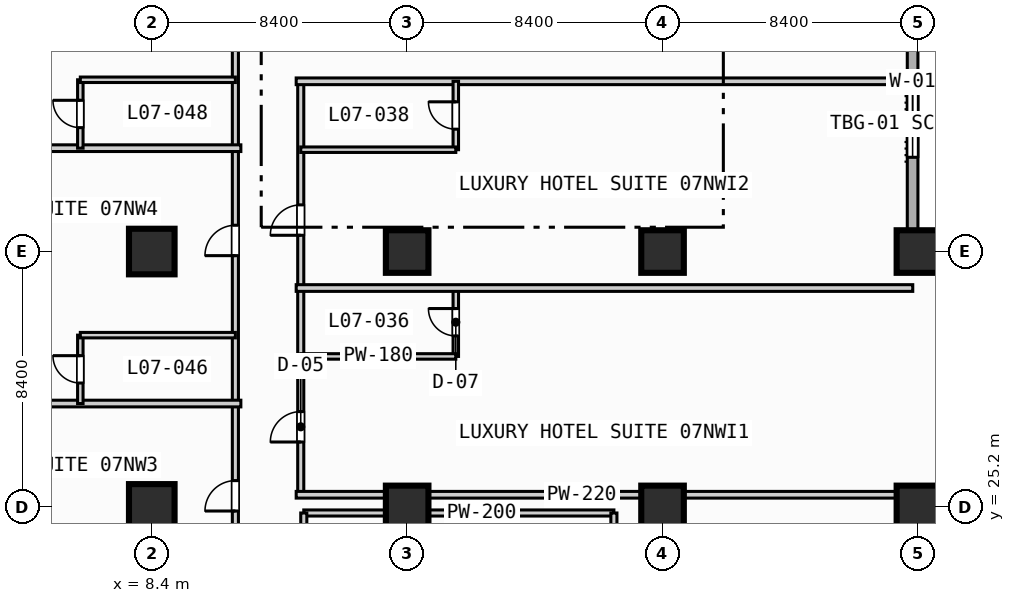
"""IFC4 building model, lengths in metres.
Left out: names, types, materials, properties, quantities, classifications, styles, units other than length and angle.
Written with IfcOpenShell. Run it as: python <this file> out.ifc"""

import sys

from ifc_helpers import new_model, si_unit, direction, frame, frame_2d, origin, origin_2d, place, context, subcontext, project, spatial, rectangle, extrude, element, fill, save


model = new_model("IFC4")
c1 = context("Model", 3, precision=1e-05, world=origin(), true_north=direction((0.0, 1.0)))
c2 = subcontext(c1, "Body", "Model", "MODEL_VIEW")
j1 = project(units=[si_unit("LENGTHUNIT", "METRE"), si_unit("PLANEANGLEUNIT", "RADIAN")], contexts=[c1])
p1 = place(None, origin())
s1 = spatial("IfcSite", under=j1, at=p1, CompositionType="ELEMENT")
p2 = place(p1, origin())
s2 = spatial("IfcBuilding", under=s1, at=p2, CompositionType="ELEMENT")
p3 = place(p2, frame((0.0, 0.0, 35.8)))
s3 = spatial("IfcBuildingStorey", under=s2, at=p3, CompositionType="ELEMENT", Elevation=35.8)
for number, where, z_axis, x_axis in (
    (1, (8.4, 25.2, 0.0), (0.0, 0.0, 1.0), (1.0, 0.0, 0.0)),
    (2, (8.4, 33.6, 0.0), (0.0, 0.0, 1.0), (1.0, 0.0, 0.0)),
):
    element("IfcColumn", number, at=place(p3, frame(where, z_axis=z_axis, x_axis=x_axis)), inside=s3, PredefinedType="COLUMN", context=c2, shape_type="SweptSolid", body=[
        extrude(rectangle(XDim=1.5, YDim=1.5, at=origin_2d()), origin(), (0.0, 0.0, 1.0), 3.8),
    ])
for number, where, z_axis, x_axis in (
    (3, (16.8, 25.2, 0.0), (0.0, 0.0, 1.0), (1.0, 0.0, 0.0)),
    (4, (16.8, 33.6, 0.0), (0.0, 0.0, 1.0), (1.0, 0.0, 0.0)),
    (5, (25.2, 25.2, 0.0), (0.0, 0.0, 1.0), (1.0, 0.0, 0.0)),
    (6, (25.2, 33.6, 0.0), (0.0, 0.0, 1.0), (1.0, 0.0, 0.0)),
    (7, (33.6, 25.2, 0.0), (0.0, 0.0, 1.0), (1.0, 0.0, 0.0)),
    (8, (33.6, 33.6, 0.0), (0.0, 0.0, 1.0), (1.0, 0.0, 0.0)),
):
    element("IfcColumn", number, at=place(p3, frame(where, z_axis=z_axis, x_axis=x_axis)), inside=s3, PredefinedType="COLUMN", context=c2, shape_type="SweptSolid", body=[
        extrude(rectangle(XDim=1.4, YDim=1.4, at=origin_2d()), origin(), (0.0, 0.0, 1.0), 3.8),
    ])
p4 = place(p3, frame((33.425, 89.225, 0.0), z_axis=(0.0, 0.0, 1.0), x_axis=(0.0, -1.0, 0.0)))
e9 = element("IfcWall", 9, at=p4, inside=s3, PredefinedType="STANDARD", context=c2, shape_type="SweptSolid", body=[
    extrude(rectangle(XDim=55.8, YDim=0.35, at=frame_2d((27.9, 0.0))), origin(), (0.0, 0.0, 1.0), 3.55),
])
p5 = place(p4, frame((50.325, 0.0, 0.85)))
e10 = element("IfcOpeningElement", 10, at=p5, cuts=e9, PredefinedType="OPENING", context=c2, shape_type="SweptSolid", body=[
    extrude(rectangle(XDim=2.2, YDim=1.8, at=frame_2d((1.1, 0.9))), frame((0.0, 0.185, 0.0), z_axis=(0.0, -1.0, 0.0), x_axis=(1.0, 0.0, 0.0)), (0.0, 0.0, 1.0), 0.37),
])
p6 = place(p3, frame((33.425, 33.425, 0.0), z_axis=(0.0, 0.0, 1.0), x_axis=(1.0, 0.0, 0.0)))
e11 = element("IfcWall", 11, at=p6, inside=s3, PredefinedType="STANDARD", context=c2, shape_type="SweptSolid", body=[
    extrude(rectangle(XDim=55.8, YDim=0.35, at=frame_2d((27.9, 0.0))), origin(), (0.0, 0.0, 1.0), 3.55),
])
p7 = place(p6, frame((12.075, 0.0, 0.0)))
e12 = element("IfcOpeningElement", 12, at=p7, cuts=e11, PredefinedType="OPENING", context=c2, shape_type="SweptSolid", body=[
    extrude(rectangle(XDim=1.4, YDim=2.2, at=frame_2d((0.7, 1.1))), frame((0.0, 0.185, 0.0), z_axis=(0.0, -1.0, 0.0), x_axis=(1.0, 0.0, 0.0)), (0.0, 0.0, 1.0), 0.37),
])
p8 = place(p3, frame((18.6, 13.4, 0.0), z_axis=(0.0, 0.0, 1.0), x_axis=(0.0, 1.0, 0.0)))
e13 = element("IfcWall", 13, at=p8, inside=s3, PredefinedType="PARTITIONING", context=c2, shape_type="SweptSolid", body=[
    extrude(rectangle(XDim=11.6, YDim=0.16, at=frame_2d((5.8, 0.0))), origin(), (0.0, 0.0, 1.0), 3.55),
])
p9 = place(p3, frame((13.4, 25.0, 0.0), z_axis=(0.0, 0.0, 1.0), x_axis=(1.0, 0.0, 0.0)))
e14 = element("IfcWall", 14, at=p9, inside=s3, PredefinedType="PARTITIONING", context=c2, shape_type="SweptSolid", body=[
    extrude(rectangle(XDim=10.2, YDim=0.2, at=frame_2d((5.1, 0.0))), origin(), (0.0, 0.0, 1.0), 2.8),
])
for number, where, z_axis, x_axis in (
    (15, (13.4, 13.4, 0.0), (0.0, 0.0, 1.0), (0.0, 1.0, 0.0)),
    (16, (23.6, 13.4, 0.0), (0.0, 0.0, 1.0), (0.0, 1.0, 0.0)),
):
    element("IfcWall", number, at=place(p3, frame(where, z_axis=z_axis, x_axis=x_axis)), inside=s3, PredefinedType="PARTITIONING", context=c2, shape_type="SweptSolid", body=[
        extrude(rectangle(XDim=11.6, YDim=0.2, at=frame_2d((5.8, 0.0))), origin(), (0.0, 0.0, 1.0), 3.55),
    ])
p10 = place(p3, frame((13.3, 25.6, 0.0), z_axis=(0.0, 0.0, 1.0), x_axis=(0.0, 1.0, 0.0)))
e17 = element("IfcWall", 17, at=p10, inside=s3, PredefinedType="PARTITIONING", context=c2, shape_type="SweptSolid", body=[
    extrude(rectangle(XDim=13.6, YDim=0.2, at=frame_2d((6.8, 0.0))), origin(), (0.0, 0.0, 1.0), 3.55),
])
p11 = place(p10, frame((1.735, 0.0, 0.0)))
e18 = element("IfcOpeningElement", 18, at=p11, cuts=e17, PredefinedType="OPENING", context=c2, shape_type="SweptSolid", body=[
    extrude(rectangle(XDim=1.0, YDim=2.15, at=frame_2d((0.5, 1.075))), frame((0.0, 0.11, 0.0), z_axis=(0.0, -1.0, 0.0), x_axis=(1.0, 0.0, 0.0)), (0.0, 0.0, 1.0), 0.22),
])
p12 = place(p10, frame((8.535, 0.0, 0.0)))
e19 = element("IfcOpeningElement", 19, at=p12, cuts=e17, PredefinedType="OPENING", context=c2, shape_type="SweptSolid", body=[
    extrude(rectangle(XDim=1.0, YDim=2.15, at=frame_2d((0.5, 1.075))), frame((0.0, 0.11, 0.0), z_axis=(0.0, -1.0, 0.0), x_axis=(1.0, 0.0, 0.0)), (0.0, 0.0, 1.0), 0.22),
])
p13 = place(p3, frame((13.15, 25.6, 0.0), z_axis=(0.0, 0.0, 1.0), x_axis=(1.0, 0.0, 0.0)))
e20 = element("IfcWall", 20, at=p13, inside=s3, PredefinedType="PARTITIONING", context=c2, shape_type="SweptSolid", body=[
    extrude(rectangle(XDim=20.28, YDim=0.22, at=frame_2d((10.14, 0.0))), origin(), (0.0, 0.0, 1.0), 3.55),
])
p14 = place(p3, frame((18.4, 30.15, 0.0), z_axis=(0.0, 0.0, 1.0), x_axis=(0.0, 1.0, 0.0)))
e21 = element("IfcWall", 21, at=p14, inside=s3, PredefinedType="PLUMBINGWALL", context=c2, shape_type="SweptSolid", body=[
    extrude(rectangle(XDim=2.25, YDim=0.18, at=frame_2d((1.125, 0.0))), origin(), (0.0, 0.0, 1.0), 3.55),
])
p15 = place(p14, frame((0.675, 0.0, 0.0)))
e22 = element("IfcOpeningElement", 22, at=p15, cuts=e21, PredefinedType="OPENING", context=c2, shape_type="SweptSolid", body=[
    extrude(rectangle(XDim=0.9, YDim=2.1, at=frame_2d((0.45, 1.05))), frame((0.0, 0.1, 0.0), z_axis=(0.0, -1.0, 0.0), x_axis=(1.0, 0.0, 0.0)), (0.0, 0.0, 1.0), 0.2),
])
p16 = place(p3, frame((13.3, 30.15, 0.0), z_axis=(0.0, 0.0, 1.0), x_axis=(1.0, 0.0, 0.0)))
e23 = element("IfcWall", 23, at=p16, inside=s3, PredefinedType="PLUMBINGWALL", context=c2, shape_type="SweptSolid", body=[
    extrude(rectangle(XDim=5.1, YDim=0.18, at=frame_2d((2.55, 0.0))), origin(), (0.0, 0.0, 1.0), 3.55),
])
for number, where, z_axis, x_axis in (
    (24, (13.15, 32.4, 0.0), (0.0, 0.0, 1.0), (1.0, 0.0, 0.0)),
    (25, (13.15, 39.2, 0.0), (0.0, 0.0, 1.0), (1.0, 0.0, 0.0)),
):
    element("IfcWall", number, at=place(p3, frame(where, z_axis=z_axis, x_axis=x_axis)), inside=s3, PredefinedType="PARTITIONING", context=c2, shape_type="SweptSolid", body=[
        extrude(rectangle(XDim=20.28, YDim=0.22, at=frame_2d((10.14, 0.0))), origin(), (0.0, 0.0, 1.0), 3.55),
    ])
p17 = place(p3, frame((18.4, 36.95, 0.0), z_axis=(0.0, 0.0, 1.0), x_axis=(0.0, 1.0, 0.0)))
e26 = element("IfcWall", 26, at=p17, inside=s3, PredefinedType="PLUMBINGWALL", context=c2, shape_type="SweptSolid", body=[
    extrude(rectangle(XDim=2.25, YDim=0.18, at=frame_2d((1.125, 0.0))), origin(), (0.0, 0.0, 1.0), 3.55),
])
p18 = place(p17, frame((0.675, 0.0, 0.0)))
e27 = element("IfcOpeningElement", 27, at=p18, cuts=e26, PredefinedType="OPENING", context=c2, shape_type="SweptSolid", body=[
    extrude(rectangle(XDim=0.9, YDim=2.1, at=frame_2d((0.45, 1.05))), frame((0.0, 0.1, 0.0), z_axis=(0.0, -1.0, 0.0), x_axis=(1.0, 0.0, 0.0)), (0.0, 0.0, 1.0), 0.2),
])
p19 = place(p3, frame((13.3, 36.95, 0.0), z_axis=(0.0, 0.0, 1.0), x_axis=(1.0, 0.0, 0.0)))
e28 = element("IfcWall", 28, at=p19, inside=s3, PredefinedType="PLUMBINGWALL", context=c2, shape_type="SweptSolid", body=[
    extrude(rectangle(XDim=5.1, YDim=0.18, at=frame_2d((2.55, 0.0))), origin(), (0.0, 0.0, 1.0), 3.55),
])
p20 = place(p3, frame((11.15, 3.4, 0.0), z_axis=(0.0, 0.0, 1.0), x_axis=(0.0, 1.0, 0.0)))
e29 = element("IfcWall", 29, at=p20, inside=s3, PredefinedType="PARTITIONING", context=c2, shape_type="SweptSolid", body=[
    extrude(rectangle(XDim=85.4, YDim=0.2, at=frame_2d((42.7, 0.0))), origin(), (0.0, 0.0, 1.0), 3.55),
])
p21 = place(p20, frame((4.865, 0.0, 0.0)))
e30 = element("IfcOpeningElement", 30, at=p21, cuts=e29, PredefinedType="OPENING", context=c2, shape_type="SweptSolid", body=[
    extrude(rectangle(XDim=1.0, YDim=2.15, at=frame_2d((0.5, 1.075))), frame((0.0, 0.11, 0.0), z_axis=(0.0, -1.0, 0.0), x_axis=(1.0, 0.0, 0.0)), (0.0, 0.0, 1.0), 0.22),
])
p22 = place(p20, frame((13.265, 0.0, 0.0)))
e31 = element("IfcOpeningElement", 31, at=p22, cuts=e29, PredefinedType="OPENING", context=c2, shape_type="SweptSolid", body=[
    extrude(rectangle(XDim=1.0, YDim=2.15, at=frame_2d((0.5, 1.075))), frame((0.0, 0.11, 0.0), z_axis=(0.0, -1.0, 0.0), x_axis=(1.0, 0.0, 0.0)), (0.0, 0.0, 1.0), 0.22),
])
p23 = place(p20, frame((21.665, 0.0, 0.0)))
e32 = element("IfcOpeningElement", 32, at=p23, cuts=e29, PredefinedType="OPENING", context=c2, shape_type="SweptSolid", body=[
    extrude(rectangle(XDim=1.0, YDim=2.15, at=frame_2d((0.5, 1.075))), frame((0.0, 0.11, 0.0), z_axis=(0.0, -1.0, 0.0), x_axis=(1.0, 0.0, 0.0)), (0.0, 0.0, 1.0), 0.22),
])
p24 = place(p20, frame((30.065, 0.0, 0.0)))
e33 = element("IfcOpeningElement", 33, at=p24, cuts=e29, PredefinedType="OPENING", context=c2, shape_type="SweptSolid", body=[
    extrude(rectangle(XDim=1.0, YDim=2.15, at=frame_2d((0.5, 1.075))), frame((0.0, 0.11, 0.0), z_axis=(0.0, -1.0, 0.0), x_axis=(1.0, 0.0, 0.0)), (0.0, 0.0, 1.0), 0.22),
])
p25 = place(p20, frame((38.465, 0.0, 0.0)))
e34 = element("IfcOpeningElement", 34, at=p25, cuts=e29, PredefinedType="OPENING", context=c2, shape_type="SweptSolid", body=[
    extrude(rectangle(XDim=1.0, YDim=2.15, at=frame_2d((0.5, 1.075))), frame((0.0, 0.11, 0.0), z_axis=(0.0, -1.0, 0.0), x_axis=(1.0, 0.0, 0.0)), (0.0, 0.0, 1.0), 0.22),
])
p26 = place(p20, frame((46.865, 0.0, 0.0)))
e35 = element("IfcOpeningElement", 35, at=p26, cuts=e29, PredefinedType="OPENING", context=c2, shape_type="SweptSolid", body=[
    extrude(rectangle(XDim=1.0, YDim=2.15, at=frame_2d((0.5, 1.075))), frame((0.0, 0.11, 0.0), z_axis=(0.0, -1.0, 0.0), x_axis=(1.0, 0.0, 0.0)), (0.0, 0.0, 1.0), 0.22),
])
p27 = place(p20, frame((55.265, 0.0, 0.0)))
e36 = element("IfcOpeningElement", 36, at=p27, cuts=e29, PredefinedType="OPENING", context=c2, shape_type="SweptSolid", body=[
    extrude(rectangle(XDim=1.0, YDim=2.15, at=frame_2d((0.5, 1.075))), frame((0.0, 0.11, 0.0), z_axis=(0.0, -1.0, 0.0), x_axis=(1.0, 0.0, 0.0)), (0.0, 0.0, 1.0), 0.22),
])
p28 = place(p20, frame((63.665, 0.0, 0.0)))
e37 = element("IfcOpeningElement", 37, at=p28, cuts=e29, PredefinedType="OPENING", context=c2, shape_type="SweptSolid", body=[
    extrude(rectangle(XDim=1.0, YDim=2.15, at=frame_2d((0.5, 1.075))), frame((0.0, 0.11, 0.0), z_axis=(0.0, -1.0, 0.0), x_axis=(1.0, 0.0, 0.0)), (0.0, 0.0, 1.0), 0.22),
])
p29 = place(p20, frame((72.065, 0.0, 0.0)))
e38 = element("IfcOpeningElement", 38, at=p29, cuts=e29, PredefinedType="OPENING", context=c2, shape_type="SweptSolid", body=[
    extrude(rectangle(XDim=1.0, YDim=2.15, at=frame_2d((0.5, 1.075))), frame((0.0, 0.11, 0.0), z_axis=(0.0, -1.0, 0.0), x_axis=(1.0, 0.0, 0.0)), (0.0, 0.0, 1.0), 0.22),
])
p30 = place(p20, frame((81.165, 0.0, 0.0)))
e39 = element("IfcOpeningElement", 39, at=p30, cuts=e29, PredefinedType="OPENING", context=c2, shape_type="SweptSolid", body=[
    extrude(rectangle(XDim=1.0, YDim=2.15, at=frame_2d((0.5, 1.075))), frame((0.0, 0.11, 0.0), z_axis=(0.0, -1.0, 0.0), x_axis=(1.0, 0.0, 0.0)), (0.0, 0.0, 1.0), 0.22),
])
p31 = place(p3, frame((0.2, 28.6, 0.0), z_axis=(0.0, 0.0, 1.0), x_axis=(1.0, 0.0, 0.0)))
e40 = element("IfcWall", 40, at=p31, inside=s3, PredefinedType="PARTITIONING", context=c2, shape_type="SweptSolid", body=[
    extrude(rectangle(XDim=11.13, YDim=0.22, at=frame_2d((5.565, 0.0))), origin(), (0.0, 0.0, 1.0), 3.55),
])
p32 = place(p3, frame((6.05, 28.6, 0.0), z_axis=(0.0, 0.0, 1.0), x_axis=(0.0, 1.0, 0.0)))
e41 = element("IfcWall", 41, at=p32, inside=s3, PredefinedType="PLUMBINGWALL", context=c2, shape_type="SweptSolid", body=[
    extrude(rectangle(XDim=2.25, YDim=0.18, at=frame_2d((1.125, 0.0))), origin(), (0.0, 0.0, 1.0), 3.55),
])
p33 = place(p32, frame((0.675, 0.0, 0.0)))
e42 = element("IfcOpeningElement", 42, at=p33, cuts=e41, PredefinedType="OPENING", context=c2, shape_type="SweptSolid", body=[
    extrude(rectangle(XDim=0.9, YDim=2.1, at=frame_2d((0.45, 1.05))), frame((0.0, 0.1, 0.0), z_axis=(0.0, -1.0, 0.0), x_axis=(1.0, 0.0, 0.0)), (0.0, 0.0, 1.0), 0.2),
])
p34 = place(p3, frame((6.05, 30.85, 0.0), z_axis=(0.0, 0.0, 1.0), x_axis=(1.0, 0.0, 0.0)))
e43 = element("IfcWall", 43, at=p34, inside=s3, PredefinedType="PLUMBINGWALL", context=c2, shape_type="SweptSolid", body=[
    extrude(rectangle(XDim=5.1, YDim=0.18, at=frame_2d((2.55, 0.0))), origin(), (0.0, 0.0, 1.0), 3.55),
])
p35 = place(p3, frame((0.2, 37.0, 0.0), z_axis=(0.0, 0.0, 1.0), x_axis=(1.0, 0.0, 0.0)))
e44 = element("IfcWall", 44, at=p35, inside=s3, PredefinedType="PARTITIONING", context=c2, shape_type="SweptSolid", body=[
    extrude(rectangle(XDim=11.13, YDim=0.22, at=frame_2d((5.565, 0.0))), origin(), (0.0, 0.0, 1.0), 3.55),
])
p36 = place(p3, frame((6.05, 37.0, 0.0), z_axis=(0.0, 0.0, 1.0), x_axis=(0.0, 1.0, 0.0)))
e45 = element("IfcWall", 45, at=p36, inside=s3, PredefinedType="PLUMBINGWALL", context=c2, shape_type="SweptSolid", body=[
    extrude(rectangle(XDim=2.25, YDim=0.18, at=frame_2d((1.125, 0.0))), origin(), (0.0, 0.0, 1.0), 3.55),
])
p37 = place(p36, frame((0.675, 0.0, 0.0)))
e46 = element("IfcOpeningElement", 46, at=p37, cuts=e45, PredefinedType="OPENING", context=c2, shape_type="SweptSolid", body=[
    extrude(rectangle(XDim=0.9, YDim=2.1, at=frame_2d((0.45, 1.05))), frame((0.0, 0.1, 0.0), z_axis=(0.0, -1.0, 0.0), x_axis=(1.0, 0.0, 0.0)), (0.0, 0.0, 1.0), 0.2),
])
p38 = place(p3, frame((6.05, 39.25, 0.0), z_axis=(0.0, 0.0, 1.0), x_axis=(1.0, 0.0, 0.0)))
e47 = element("IfcWall", 47, at=p38, inside=s3, PredefinedType="PLUMBINGWALL", context=c2, shape_type="SweptSolid", body=[
    extrude(rectangle(XDim=5.1, YDim=0.18, at=frame_2d((2.55, 0.0))), origin(), (0.0, 0.0, 1.0), 3.55),
])
p39 = place(p5, origin())
e48 = element("IfcWindow", 48, at=p39, inside=s3, PartitioningType="SINGLE_PANEL", PredefinedType="WINDOW", context=c2, shape_type="SweptSolid", body=[
    extrude(rectangle(XDim=2.2, YDim=1.8, at=frame_2d((1.1, 0.9))), frame((0.0, 0.03, 0.0), z_axis=(0.0, -1.0, 0.0), x_axis=(1.0, 0.0, 0.0)), (0.0, 0.0, 1.0), 0.06),
])
fill(e10, e48)
p40 = place(p11, origin())
e49 = element("IfcDoor", 49, at=p40, inside=s3, OperationType="SINGLE_SWING_LEFT", PredefinedType="DOOR", context=c2, shape_type="SweptSolid", body=[
    extrude(rectangle(XDim=1.0, YDim=2.15, at=frame_2d((0.5, 1.075))), frame((0.0, 0.025, 0.0), z_axis=(0.0, -1.0, 0.0), x_axis=(1.0, 0.0, 0.0)), (0.0, 0.0, 1.0), 0.05),
])
fill(e18, e49)
p41 = place(p12, origin())
e50 = element("IfcDoor", 50, at=p41, inside=s3, OperationType="SINGLE_SWING_LEFT", PredefinedType="DOOR", context=c2, shape_type="SweptSolid", body=[
    extrude(rectangle(XDim=1.0, YDim=2.15, at=frame_2d((0.5, 1.075))), frame((0.0, 0.025, 0.0), z_axis=(0.0, -1.0, 0.0), x_axis=(1.0, 0.0, 0.0)), (0.0, 0.0, 1.0), 0.05),
])
fill(e19, e50)
p42 = place(p15, origin())
e51 = element("IfcDoor", 51, at=p42, inside=s3, OperationType="SINGLE_SWING_RIGHT", PredefinedType="DOOR", context=c2, shape_type="SweptSolid", body=[
    extrude(rectangle(XDim=0.9, YDim=2.1, at=frame_2d((0.45, 1.05))), frame((0.0, 0.025, 0.0), z_axis=(0.0, -1.0, 0.0), x_axis=(1.0, 0.0, 0.0)), (0.0, 0.0, 1.0), 0.05),
])
fill(e22, e51)
p43 = place(p18, origin())
e52 = element("IfcDoor", 52, at=p43, inside=s3, OperationType="SINGLE_SWING_RIGHT", PredefinedType="DOOR", context=c2, shape_type="SweptSolid", body=[
    extrude(rectangle(XDim=0.9, YDim=2.1, at=frame_2d((0.45, 1.05))), frame((0.0, 0.025, 0.0), z_axis=(0.0, -1.0, 0.0), x_axis=(1.0, 0.0, 0.0)), (0.0, 0.0, 1.0), 0.05),
])
fill(e27, e52)
p44 = place(p23, origin())
e53 = element("IfcDoor", 53, at=p44, inside=s3, OperationType="SINGLE_SWING_LEFT", PredefinedType="DOOR", context=c2, shape_type="SweptSolid", body=[
    extrude(rectangle(XDim=1.0, YDim=2.15, at=frame_2d((0.5, 1.075))), frame((0.0, 0.025, 0.0), z_axis=(0.0, -1.0, 0.0), x_axis=(1.0, 0.0, 0.0)), (0.0, 0.0, 1.0), 0.05),
])
fill(e32, e53)
p45 = place(p24, origin())
e54 = element("IfcDoor", 54, at=p45, inside=s3, OperationType="SINGLE_SWING_LEFT", PredefinedType="DOOR", context=c2, shape_type="SweptSolid", body=[
    extrude(rectangle(XDim=1.0, YDim=2.15, at=frame_2d((0.5, 1.075))), frame((0.0, 0.025, 0.0), z_axis=(0.0, -1.0, 0.0), x_axis=(1.0, 0.0, 0.0)), (0.0, 0.0, 1.0), 0.05),
])
fill(e33, e54)
p46 = place(p33, origin())
e55 = element("IfcDoor", 55, at=p46, inside=s3, OperationType="SINGLE_SWING_RIGHT", PredefinedType="DOOR", context=c2, shape_type="SweptSolid", body=[
    extrude(rectangle(XDim=0.9, YDim=2.1, at=frame_2d((0.45, 1.05))), frame((0.0, 0.025, 0.0), z_axis=(0.0, -1.0, 0.0), x_axis=(1.0, 0.0, 0.0)), (0.0, 0.0, 1.0), 0.05),
])
fill(e42, e55)
p47 = place(p37, origin())
e56 = element("IfcDoor", 56, at=p47, inside=s3, OperationType="SINGLE_SWING_RIGHT", PredefinedType="DOOR", context=c2, shape_type="SweptSolid", body=[
    extrude(rectangle(XDim=0.9, YDim=2.1, at=frame_2d((0.45, 1.05))), frame((0.0, 0.025, 0.0), z_axis=(0.0, -1.0, 0.0), x_axis=(1.0, 0.0, 0.0)), (0.0, 0.0, 1.0), 0.05),
])
fill(e46, e56)
save(model, sys.argv[1])
